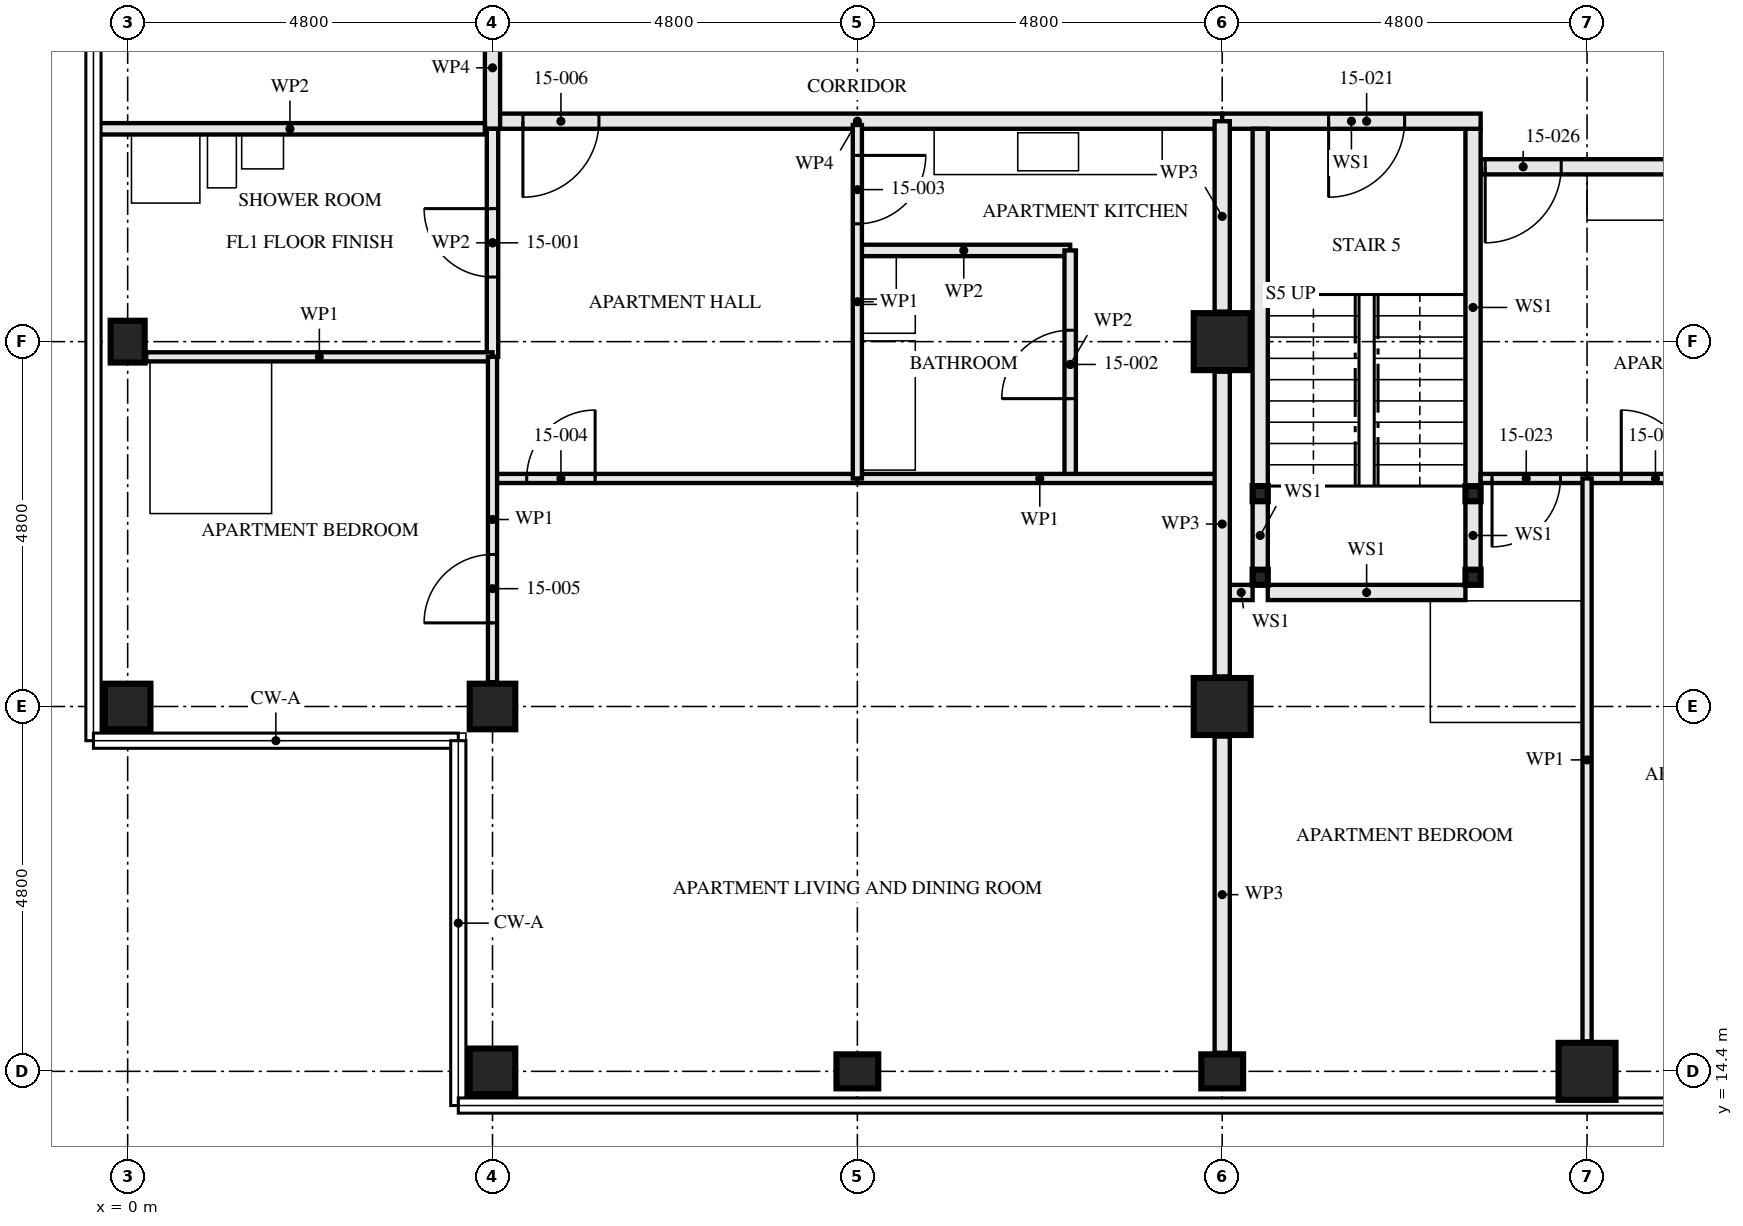
"""IFC4 building model, lengths in metres.
Left out: names, types, materials, properties, quantities, classifications, styles, units other than length and angle.
Written with IfcOpenShell. Run it as: python <this file> out.ifc"""

import sys

from ifc_helpers import new_model, si_unit, direction, frame, frame_2d, origin, origin_2d, place, context, subcontext, project, spatial, rectangle, hollow_rectangle, i_section, extrude, element, fill, save


model = new_model("IFC4")
c1 = context("Model", 3, precision=1e-05, world=origin(), true_north=direction((0.0, 1.0)))
c2 = subcontext(c1, "Body", "Model", "MODEL_VIEW")
j1 = project(units=[si_unit("LENGTHUNIT", "METRE"), si_unit("PLANEANGLEUNIT", "RADIAN")], contexts=[c1])
p1 = place(None, origin())
s1 = spatial("IfcSite", under=j1, at=p1, CompositionType="ELEMENT")
p2 = place(p1, origin())
s2 = spatial("IfcBuilding", under=s1, at=p2, CompositionType="ELEMENT")
p3 = place(p2, frame((0.0, 0.0, 58.5)))
s3 = spatial("IfcBuildingStorey", under=s2, at=p3, CompositionType="ELEMENT", Elevation=58.5)
p4 = place(p3, frame((0.0, 19.2, 0.0), z_axis=(0.0, 0.0, 1.0), x_axis=(0.0, 1.0, 0.0)))
e1 = element("IfcColumn", 1, at=p4, inside=s3, PredefinedType="COLUMN", context=c2, shape_type="SweptSolid", body=[
    extrude(hollow_rectangle(XDim=0.6, YDim=0.6, WallThickness=0.05, at=origin_2d()), origin(), (0.0, 0.0, 1.0), 3.5),
])
p5 = place(p3, frame((0.0, 24.0, 0.0), z_axis=(0.0, 0.0, 1.0), x_axis=(1.0, 0.0, 0.0)))
e2 = element("IfcColumn", 2, at=p5, inside=s3, PredefinedType="COLUMN", context=c2, shape_type="SweptSolid", body=[
    extrude(i_section(OverallWidth=0.448, OverallDepth=0.55, WebThickness=0.072, FlangeThickness=0.115, FilletRadius=0.015, at=origin_2d()), origin(), (0.0, 0.0, 1.0), 3.5),
])
for number, where, z_axis, x_axis in (
    (3, (4.8, 14.4, 0.0), (0.0, 0.0, 1.0), (0.0, 1.0, 0.0)),
    (4, (4.8, 19.2, 0.0), (0.0, 0.0, 1.0), (0.0, 1.0, 0.0)),
):
    element("IfcColumn", number, at=place(p3, frame(where, z_axis=z_axis, x_axis=x_axis)), inside=s3, PredefinedType="COLUMN", context=c2, shape_type="SweptSolid", body=[
        extrude(hollow_rectangle(XDim=0.6, YDim=0.6, WallThickness=0.05, at=origin_2d()), origin(), (0.0, 0.0, 1.0), 3.5),
    ])
for number, where, z_axis, x_axis in (
    (5, (9.6, 14.4, 0.0), (0.0, 0.0, 1.0), (0.0, 1.0, 0.0)),
    (6, (14.4, 14.4, 0.0), (0.0, 0.0, 1.0), (0.0, 1.0, 0.0)),
):
    element("IfcColumn", number, at=place(p3, frame(where, z_axis=z_axis, x_axis=x_axis)), inside=s3, PredefinedType="COLUMN", context=c2, shape_type="SweptSolid", body=[
        extrude(i_section(OverallWidth=0.448, OverallDepth=0.55, WebThickness=0.072, FlangeThickness=0.115, FilletRadius=0.015, at=origin_2d()), origin(), (0.0, 0.0, 1.0), 3.5),
    ])
for number, where, z_axis, x_axis in (
    (7, (14.4, 19.2, 0.0), (0.0, 0.0, 1.0), (1.0, 0.0, 0.0)),
    (8, (14.4, 24.0, 0.0), (0.0, 0.0, 1.0), (1.0, 0.0, 0.0)),
    (9, (19.2, 14.4, 0.0), (0.0, 0.0, 1.0), (0.0, 1.0, 0.0)),
):
    element("IfcColumn", number, at=place(p3, frame(where, z_axis=z_axis, x_axis=x_axis)), inside=s3, PredefinedType="COLUMN", context=c2, shape_type="SweptSolid", body=[
        extrude(hollow_rectangle(XDim=0.75, YDim=0.75, WallThickness=0.08, at=origin_2d()), origin(), (0.0, 0.0, 1.0), 3.5),
    ])
for number, where, z_axis, x_axis in (
    (10, (14.9, 20.9, 0.0), (0.0, 0.0, 1.0), (1.0, 0.0, 0.0)),
    (11, (17.7, 20.9, 0.0), (0.0, 0.0, 1.0), (1.0, 0.0, 0.0)),
    (12, (14.9, 22.0, 0.0), (0.0, 0.0, 1.0), (1.0, 0.0, 0.0)),
    (13, (17.7, 22.0, 0.0), (0.0, 0.0, 1.0), (1.0, 0.0, 0.0)),
):
    element("IfcColumn", number, at=place(p3, frame(where, z_axis=z_axis, x_axis=x_axis)), inside=s3, PredefinedType="COLUMN", context=c2, shape_type="SweptSolid", body=[
        extrude(hollow_rectangle(XDim=0.2, YDim=0.2, WallThickness=0.008, at=origin_2d()), origin(), (0.0, 0.0, 1.0), 3.33),
    ])
p6 = place(p3, frame((4.8, 23.8, 0.0), z_axis=(0.0, 0.0, 1.0), x_axis=(0.0, 1.0, 0.0)))
e14 = element("IfcWall", 14, at=p6, inside=s3, PredefinedType="PARTITIONING", context=c2, shape_type="SweptSolid", body=[
    extrude(rectangle(XDim=3.0, YDim=0.15, at=frame_2d((1.5, 0.0))), origin(), (0.0, 0.0, 1.0), 2.55),
])
p7 = place(p6, frame((1.05, 0.0, 0.0)))
e15 = element("IfcOpeningElement", 15, at=p7, cuts=e14, PredefinedType="OPENING", context=c2, shape_type="SweptSolid", body=[
    extrude(rectangle(XDim=0.9, YDim=2.1, at=frame_2d((0.45, 1.05))), frame((0.0, 0.085, 0.0), z_axis=(0.0, -1.0, 0.0), x_axis=(1.0, 0.0, 0.0)), (0.0, 0.0, 1.0), 0.171),
])
p8 = place(p3, frame((12.4, 22.2, 0.0), z_axis=(0.0, 0.0, 1.0), x_axis=(0.0, 1.0, 0.0)))
e16 = element("IfcWall", 16, at=p8, inside=s3, PredefinedType="PARTITIONING", context=c2, shape_type="SweptSolid", body=[
    extrude(rectangle(XDim=3.0, YDim=0.15, at=frame_2d((1.5, 0.0))), origin(), (0.0, 0.0, 1.0), 2.55),
])
p9 = place(p8, frame((1.05, 0.0, 0.0)))
e17 = element("IfcOpeningElement", 17, at=p9, cuts=e16, PredefinedType="OPENING", context=c2, shape_type="SweptSolid", body=[
    extrude(rectangle(XDim=0.9, YDim=2.1, at=frame_2d((0.45, 1.05))), frame((0.0, 0.085, 0.0), z_axis=(0.0, -1.0, 0.0), x_axis=(1.0, 0.0, 0.0)), (0.0, 0.0, 1.0), 0.171),
])
p10 = place(p3, frame((9.6, 25.2, 0.0), z_axis=(0.0, 0.0, 1.0), x_axis=(1.0, 0.0, 0.0)))
e18 = element("IfcWall", 18, at=p10, inside=s3, PredefinedType="PARTITIONING", context=c2, shape_type="SweptSolid", body=[
    extrude(rectangle(XDim=2.8, YDim=0.15, at=frame_2d((1.4, 0.0))), origin(), (0.0, 0.0, 1.0), 3.33),
])
p11 = place(p3, frame((9.6, 22.2, 0.0), z_axis=(0.0, 0.0, 1.0), x_axis=(0.0, 1.0, 0.0)))
e19 = element("IfcWall", 19, at=p11, inside=s3, PredefinedType="PARTITIONING", context=c2, shape_type="SweptSolid", body=[
    extrude(rectangle(XDim=4.65, YDim=0.12, at=frame_2d((2.325, 0.0))), origin(), (0.0, 0.0, 1.0), 2.55),
])
p12 = place(p11, frame((3.35, 0.0, 0.0)))
e20 = element("IfcOpeningElement", 20, at=p12, cuts=e19, PredefinedType="OPENING", context=c2, shape_type="SweptSolid", body=[
    extrude(rectangle(XDim=0.9, YDim=2.1, at=frame_2d((0.45, 1.05))), frame((0.0, 0.071, 0.0), z_axis=(0.0, -1.0, 0.0), x_axis=(1.0, 0.0, 0.0)), (0.0, 0.0, 1.0), 0.141),
])
p13 = place(p3, frame((0.244, 23.8, 0.0), z_axis=(0.0, 0.0, 1.0), x_axis=(1.0, 0.0, 0.0)))
e21 = element("IfcWall", 21, at=p13, inside=s3, PredefinedType="PARTITIONING", context=c2, shape_type="SweptSolid", body=[
    extrude(rectangle(XDim=4.556, YDim=0.12, at=frame_2d((2.278, 0.0))), origin(), (0.0, 0.0, 1.0), 3.33),
])
p14 = place(p3, frame((4.8, 22.2, 0.0), z_axis=(0.0, 0.0, 1.0), x_axis=(1.0, 0.0, 0.0)))
e22 = element("IfcWall", 22, at=p14, inside=s3, PredefinedType="PARTITIONING", context=c2, shape_type="SweptSolid", body=[
    extrude(rectangle(XDim=4.8, YDim=0.12, at=frame_2d((2.4, 0.0))), origin(), (0.0, 0.0, 1.0), 3.33),
])
p15 = place(p14, frame((0.45, 0.0, 0.0)))
e23 = element("IfcOpeningElement", 23, at=p15, cuts=e22, PredefinedType="OPENING", context=c2, shape_type="SweptSolid", body=[
    extrude(rectangle(XDim=0.9, YDim=2.1, at=frame_2d((0.45, 1.05))), frame((0.0, 0.071, 0.0), z_axis=(0.0, -1.0, 0.0), x_axis=(1.0, 0.0, 0.0)), (0.0, 0.0, 1.0), 0.141),
])
p16 = place(p3, frame((9.6, 22.2, 0.0), z_axis=(0.0, 0.0, 1.0), x_axis=(1.0, 0.0, 0.0)))
e24 = element("IfcWall", 24, at=p16, inside=s3, PredefinedType="PARTITIONING", context=c2, shape_type="SweptSolid", body=[
    extrude(rectangle(XDim=4.8, YDim=0.12, at=frame_2d((2.4, 0.0))), origin(), (0.0, 0.0, 1.0), 3.33),
])
p17 = place(p3, frame((4.8, 19.52, 0.0), z_axis=(0.0, 0.0, 1.0), x_axis=(0.0, 1.0, 0.0)))
e25 = element("IfcWall", 25, at=p17, inside=s3, PredefinedType="PARTITIONING", context=c2, shape_type="SweptSolid", body=[
    extrude(rectangle(XDim=4.28, YDim=0.12, at=frame_2d((2.14, 0.0))), origin(), (0.0, 0.0, 1.0), 3.33),
])
p18 = place(p17, frame((0.78, 0.0, 0.0)))
e26 = element("IfcOpeningElement", 26, at=p18, cuts=e25, PredefinedType="OPENING", context=c2, shape_type="SweptSolid", body=[
    extrude(rectangle(XDim=0.9, YDim=2.1, at=frame_2d((0.45, 1.05))), frame((0.0, 0.071, 0.0), z_axis=(0.0, -1.0, 0.0), x_axis=(1.0, 0.0, 0.0)), (0.0, 0.0, 1.0), 0.141),
])
p19 = place(p3, frame((4.8, 26.9, 0.0), z_axis=(0.0, 0.0, 1.0), x_axis=(1.0, 0.0, 0.0)))
e27 = element("IfcWall", 27, at=p19, inside=s3, PredefinedType="PARTITIONING", context=c2, shape_type="SweptSolid", body=[
    extrude(rectangle(XDim=9.6, YDim=0.2, at=frame_2d((4.8, 0.0))), origin(), (0.0, 0.0, 1.0), 3.33),
])
p20 = place(p19, frame((0.4, 0.0, 0.0)))
e28 = element("IfcOpeningElement", 28, at=p20, cuts=e27, PredefinedType="OPENING", context=c2, shape_type="SweptSolid", body=[
    extrude(rectangle(XDim=1.0, YDim=2.1, at=frame_2d((0.5, 1.05))), frame((0.0, 0.111, 0.0), z_axis=(0.0, -1.0, 0.0), x_axis=(1.0, 0.0, 0.0)), (0.0, 0.0, 1.0), 0.221),
])
p21 = place(p3, frame((4.8, 26.8, 0.0), z_axis=(0.0, 0.0, 1.0), x_axis=(0.0, 1.0, 0.0)))
e29 = element("IfcWall", 29, at=p21, inside=s3, PredefinedType="PARTITIONING", context=c2, shape_type="SweptSolid", body=[
    extrude(rectangle(XDim=1.605, YDim=0.2, at=frame_2d((0.802, 0.0))), origin(), (0.0, 0.0, 1.0), 3.33),
])
p22 = place(p3, frame((14.9, 21.0, 0.0), z_axis=(0.0, 0.0, 1.0), x_axis=(0.0, 1.0, 0.0)))
e30 = element("IfcWall", 30, at=p22, inside=s3, PredefinedType="SOLIDWALL", context=c2, shape_type="SweptSolid", body=[
    extrude(rectangle(XDim=0.9, YDim=0.2, at=frame_2d((0.45, 0.0))), origin(), (0.0, 0.0, 1.0), 2.99),
])
p23 = place(p3, frame((14.9, 22.1, 0.0), z_axis=(0.0, 0.0, 1.0), x_axis=(0.0, 1.0, 0.0)))
e31 = element("IfcWall", 31, at=p23, inside=s3, PredefinedType="SOLIDWALL", context=c2, shape_type="SweptSolid", body=[
    extrude(rectangle(XDim=4.7, YDim=0.2, at=frame_2d((2.35, 0.0))), origin(), (0.0, 0.0, 1.0), 2.99),
])
p24 = place(p3, frame((17.7, 21.0, 0.0), z_axis=(0.0, 0.0, 1.0), x_axis=(0.0, 1.0, 0.0)))
e32 = element("IfcWall", 32, at=p24, inside=s3, PredefinedType="SOLIDWALL", context=c2, shape_type="SweptSolid", body=[
    extrude(rectangle(XDim=0.9, YDim=0.2, at=frame_2d((0.45, 0.0))), origin(), (0.0, 0.0, 1.0), 2.99),
])
p25 = place(p3, frame((17.7, 22.1, 0.0), z_axis=(0.0, 0.0, 1.0), x_axis=(0.0, 1.0, 0.0)))
e33 = element("IfcWall", 33, at=p25, inside=s3, PredefinedType="SOLIDWALL", context=c2, shape_type="SweptSolid", body=[
    extrude(rectangle(XDim=4.7, YDim=0.2, at=frame_2d((2.35, 0.0))), origin(), (0.0, 0.0, 1.0), 2.99),
])
p26 = place(p3, frame((14.5, 20.7, 0.0), z_axis=(0.0, 0.0, 1.0), x_axis=(1.0, 0.0, 0.0)))
e34 = element("IfcWall", 34, at=p26, inside=s3, PredefinedType="SOLIDWALL", context=c2, shape_type="SweptSolid", body=[
    extrude(rectangle(XDim=0.3, YDim=0.2, at=frame_2d((0.15, 0.0))), origin(), (0.0, 0.0, 1.0), 3.33),
])
p27 = place(p3, frame((15.0, 20.7, 0.0), z_axis=(0.0, 0.0, 1.0), x_axis=(1.0, 0.0, 0.0)))
e35 = element("IfcWall", 35, at=p27, inside=s3, PredefinedType="SOLIDWALL", context=c2, shape_type="SweptSolid", body=[
    extrude(rectangle(XDim=2.6, YDim=0.2, at=frame_2d((1.3, 0.0))), origin(), (0.0, 0.0, 1.0), 3.33),
])
p28 = place(p3, frame((14.4, 26.9, 0.0), z_axis=(0.0, 0.0, 1.0), x_axis=(1.0, 0.0, 0.0)))
e36 = element("IfcWall", 36, at=p28, inside=s3, PredefinedType="SOLIDWALL", context=c2, shape_type="SweptSolid", body=[
    extrude(rectangle(XDim=3.4, YDim=0.2, at=frame_2d((1.7, 0.0))), origin(), (0.0, 0.0, 1.0), 3.33),
])
p29 = place(p28, frame((1.4, 0.0, 0.0)))
e37 = element("IfcOpeningElement", 37, at=p29, cuts=e36, PredefinedType="OPENING", context=c2, shape_type="SweptSolid", body=[
    extrude(rectangle(XDim=1.0, YDim=2.1, at=frame_2d((0.5, 1.05))), frame((0.0, 0.111, 0.0), z_axis=(0.0, -1.0, 0.0), x_axis=(1.0, 0.0, 0.0)), (0.0, 0.0, 1.0), 0.221),
])
p30 = place(p3, frame((17.8, 22.2, 0.0), z_axis=(0.0, 0.0, 1.0), x_axis=(1.0, 0.0, 0.0)))
e38 = element("IfcWall", 38, at=p30, inside=s3, PredefinedType="PARTITIONING", context=c2, shape_type="SweptSolid", body=[
    extrude(rectangle(XDim=1.4, YDim=0.12, at=frame_2d((0.7, 0.0))), origin(), (0.0, 0.0, 1.0), 3.33),
])
p31 = place(p30, frame((0.15, 0.0, 0.0)))
e39 = element("IfcOpeningElement", 39, at=p31, cuts=e38, PredefinedType="OPENING", context=c2, shape_type="SweptSolid", body=[
    extrude(rectangle(XDim=0.9, YDim=2.1, at=frame_2d((0.45, 1.05))), frame((0.0, 0.071, 0.0), z_axis=(0.0, -1.0, 0.0), x_axis=(1.0, 0.0, 0.0)), (0.0, 0.0, 1.0), 0.141),
])
p32 = place(p3, frame((19.2, 22.2, 0.0), z_axis=(0.0, 0.0, 1.0), x_axis=(1.0, 0.0, 0.0)))
e40 = element("IfcWall", 40, at=p32, inside=s3, PredefinedType="PARTITIONING", context=c2, shape_type="SweptSolid", body=[
    extrude(rectangle(XDim=4.8, YDim=0.12, at=frame_2d((2.4, 0.0))), origin(), (0.0, 0.0, 1.0), 3.33),
])
p33 = place(p32, frame((0.45, 0.0, 0.0)))
e41 = element("IfcOpeningElement", 41, at=p33, cuts=e40, PredefinedType="OPENING", context=c2, shape_type="SweptSolid", body=[
    extrude(rectangle(XDim=0.9, YDim=2.1, at=frame_2d((0.45, 1.05))), frame((0.0, 0.071, 0.0), z_axis=(0.0, -1.0, 0.0), x_axis=(1.0, 0.0, 0.0)), (0.0, 0.0, 1.0), 0.141),
])
p34 = place(p3, frame((19.2, 14.795, 0.0), z_axis=(0.0, 0.0, 1.0), x_axis=(0.0, 1.0, 0.0)))
e42 = element("IfcWall", 42, at=p34, inside=s3, PredefinedType="PARTITIONING", context=c2, shape_type="SweptSolid", body=[
    extrude(rectangle(XDim=7.405, YDim=0.12, at=frame_2d((3.703, 0.0))), origin(), (0.0, 0.0, 1.0), 2.55),
])
p35 = place(p3, frame((17.8, 26.3, 0.0), z_axis=(0.0, 0.0, 1.0), x_axis=(1.0, 0.0, 0.0)))
e43 = element("IfcWall", 43, at=p35, inside=s3, PredefinedType="PARTITIONING", context=c2, shape_type="SweptSolid", body=[
    extrude(rectangle(XDim=11.0, YDim=0.2, at=frame_2d((5.5, 0.0))), origin(), (0.0, 0.0, 1.0), 2.55),
])
p36 = place(p35, frame((0.06, 0.0, 0.0)))
e44 = element("IfcOpeningElement", 44, at=p36, cuts=e43, PredefinedType="OPENING", context=c2, shape_type="SweptSolid", body=[
    extrude(rectangle(XDim=1.0, YDim=2.1, at=frame_2d((0.5, 1.05))), frame((0.0, 0.111, 0.0), z_axis=(0.0, -1.0, 0.0), x_axis=(1.0, 0.0, 0.0)), (0.0, 0.0, 1.0), 0.221),
])
p37 = place(p3, frame((14.4, 14.644, 0.0), z_axis=(0.0, 0.0, 1.0), x_axis=(0.0, 1.0, 0.0)))
e45 = element("IfcWall", 45, at=p37, inside=s3, PredefinedType="PARTITIONING", context=c2, shape_type="SweptSolid", body=[
    extrude(rectangle(XDim=4.161, YDim=0.2, at=frame_2d((2.081, 0.0))), origin(), (0.0, 0.0, 1.0), 2.32),
])
p38 = place(p3, frame((14.4, 19.595, 0.0), z_axis=(0.0, 0.0, 1.0), x_axis=(0.0, 1.0, 0.0)))
e46 = element("IfcWall", 46, at=p38, inside=s3, PredefinedType="PARTITIONING", context=c2, shape_type="SweptSolid", body=[
    extrude(rectangle(XDim=4.01, YDim=0.2, at=frame_2d((2.005, 0.0))), origin(), (0.0, 0.0, 1.0), 2.32),
])
p39 = place(p3, frame((14.4, 24.395, 0.0), z_axis=(0.0, 0.0, 1.0), x_axis=(0.0, 1.0, 0.0)))
e47 = element("IfcWall", 47, at=p39, inside=s3, PredefinedType="PARTITIONING", context=c2, shape_type="SweptSolid", body=[
    extrude(rectangle(XDim=2.505, YDim=0.2, at=frame_2d((1.252, 0.0))), origin(), (0.0, 0.0, 1.0), 2.32),
])
p40 = place(p3, frame((-0.43, 26.8, 0.0), z_axis=(0.0, 0.0, 1.0), x_axis=(1.0, 0.0, 0.0)))
e48 = element("IfcWall", 48, at=p40, inside=s3, PredefinedType="PARTITIONING", context=c2, shape_type="SweptSolid", body=[
    extrude(rectangle(XDim=5.13, YDim=0.15, at=frame_2d((2.565, 0.0))), origin(), (0.0, 0.0, 1.0), 2.32),
])
p41 = place(p7, origin())
e49 = element("IfcDoor", 49, at=p41, inside=s3, OperationType="SINGLE_SWING_LEFT", PredefinedType="DOOR", context=c2, shape_type="SweptSolid", body=[
    extrude(rectangle(XDim=0.9, YDim=2.1, at=frame_2d((0.45, 1.05))), frame((0.0, 0.022, 0.0), z_axis=(0.0, -1.0, 0.0), x_axis=(1.0, 0.0, 0.0)), (0.0, 0.0, 1.0), 0.044),
])
fill(e15, e49)
p42 = place(p9, origin())
e50 = element("IfcDoor", 50, at=p42, inside=s3, OperationType="SINGLE_SWING_RIGHT", PredefinedType="DOOR", context=c2, shape_type="SweptSolid", body=[
    extrude(rectangle(XDim=0.9, YDim=2.1, at=frame_2d((0.45, 1.05))), frame((0.0, 0.022, 0.0), z_axis=(0.0, -1.0, 0.0), x_axis=(1.0, 0.0, 0.0)), (0.0, 0.0, 1.0), 0.044),
])
fill(e17, e50)
p43 = place(p12, frame((0.9, 0.0, 0.0), z_axis=(0.0, 0.0, 1.0), x_axis=(-1.0, 0.0, 0.0)))
e51 = element("IfcDoor", 51, at=p43, inside=s3, OperationType="SINGLE_SWING_RIGHT", PredefinedType="DOOR", context=c2, shape_type="SweptSolid", body=[
    extrude(rectangle(XDim=0.9, YDim=2.1, at=frame_2d((0.45, 1.05))), frame((0.0, 0.022, 0.0), z_axis=(0.0, -1.0, 0.0), x_axis=(1.0, 0.0, 0.0)), (0.0, 0.0, 1.0), 0.044),
])
fill(e20, e51)
p44 = place(p15, origin())
e52 = element("IfcDoor", 52, at=p44, inside=s3, OperationType="SINGLE_SWING_LEFT", PredefinedType="DOOR", context=c2, shape_type="SweptSolid", body=[
    extrude(rectangle(XDim=0.9, YDim=2.1, at=frame_2d((0.45, 1.05))), frame((0.0, 0.022, 0.0), z_axis=(0.0, -1.0, 0.0), x_axis=(1.0, 0.0, 0.0)), (0.0, 0.0, 1.0), 0.044),
])
fill(e23, e52)
p45 = place(p18, origin())
e53 = element("IfcDoor", 53, at=p45, inside=s3, OperationType="SINGLE_SWING_RIGHT", PredefinedType="DOOR", context=c2, shape_type="SweptSolid", body=[
    extrude(rectangle(XDim=0.9, YDim=2.1, at=frame_2d((0.45, 1.05))), frame((0.0, 0.022, 0.0), z_axis=(0.0, -1.0, 0.0), x_axis=(1.0, 0.0, 0.0)), (0.0, 0.0, 1.0), 0.044),
])
fill(e26, e53)
p46 = place(p20, frame((1.0, 0.0, 0.0), z_axis=(0.0, 0.0, 1.0), x_axis=(-1.0, 0.0, 0.0)))
e54 = element("IfcDoor", 54, at=p46, inside=s3, OperationType="SINGLE_SWING_LEFT", PredefinedType="DOOR", context=c2, shape_type="SweptSolid", body=[
    extrude(rectangle(XDim=1.0, YDim=2.1, at=frame_2d((0.5, 1.05))), frame((0.0, 0.027, 0.0), z_axis=(0.0, -1.0, 0.0), x_axis=(1.0, 0.0, 0.0)), (0.0, 0.0, 1.0), 0.054),
])
fill(e28, e54)
p47 = place(p29, frame((1.0, 0.0, 0.0), z_axis=(0.0, 0.0, 1.0), x_axis=(-1.0, 0.0, 0.0)))
e55 = element("IfcDoor", 55, at=p47, inside=s3, OperationType="SINGLE_SWING_LEFT", PredefinedType="DOOR", context=c2, shape_type="SweptSolid", body=[
    extrude(rectangle(XDim=1.0, YDim=2.1, at=frame_2d((0.5, 1.05))), frame((0.0, 0.032, 0.0), z_axis=(0.0, -1.0, 0.0), x_axis=(1.0, 0.0, 0.0)), (0.0, 0.0, 1.0), 0.064),
])
fill(e37, e55)
p48 = place(p31, frame((0.9, 0.0, 0.0), z_axis=(0.0, 0.0, 1.0), x_axis=(-1.0, 0.0, 0.0)))
e56 = element("IfcDoor", 56, at=p48, inside=s3, OperationType="SINGLE_SWING_LEFT", PredefinedType="DOOR", context=c2, shape_type="SweptSolid", body=[
    extrude(rectangle(XDim=0.9, YDim=2.1, at=frame_2d((0.45, 1.05))), frame((0.0, 0.022, 0.0), z_axis=(0.0, -1.0, 0.0), x_axis=(1.0, 0.0, 0.0)), (0.0, 0.0, 1.0), 0.044),
])
fill(e39, e56)
p49 = place(p33, origin())
e57 = element("IfcDoor", 57, at=p49, inside=s3, OperationType="SINGLE_SWING_RIGHT", PredefinedType="DOOR", context=c2, shape_type="SweptSolid", body=[
    extrude(rectangle(XDim=0.9, YDim=2.1, at=frame_2d((0.45, 1.05))), frame((0.0, 0.022, 0.0), z_axis=(0.0, -1.0, 0.0), x_axis=(1.0, 0.0, 0.0)), (0.0, 0.0, 1.0), 0.044),
])
fill(e41, e57)
p50 = place(p36, frame((1.0, 0.0, 0.0), z_axis=(0.0, 0.0, 1.0), x_axis=(-1.0, 0.0, 0.0)))
e58 = element("IfcDoor", 58, at=p50, inside=s3, OperationType="SINGLE_SWING_LEFT", PredefinedType="DOOR", context=c2, shape_type="SweptSolid", body=[
    extrude(rectangle(XDim=1.0, YDim=2.1, at=frame_2d((0.5, 1.05))), frame((0.0, 0.027, 0.0), z_axis=(0.0, -1.0, 0.0), x_axis=(1.0, 0.0, 0.0)), (0.0, 0.0, 1.0), 0.054),
])
fill(e44, e58)
save(model, sys.argv[1])
